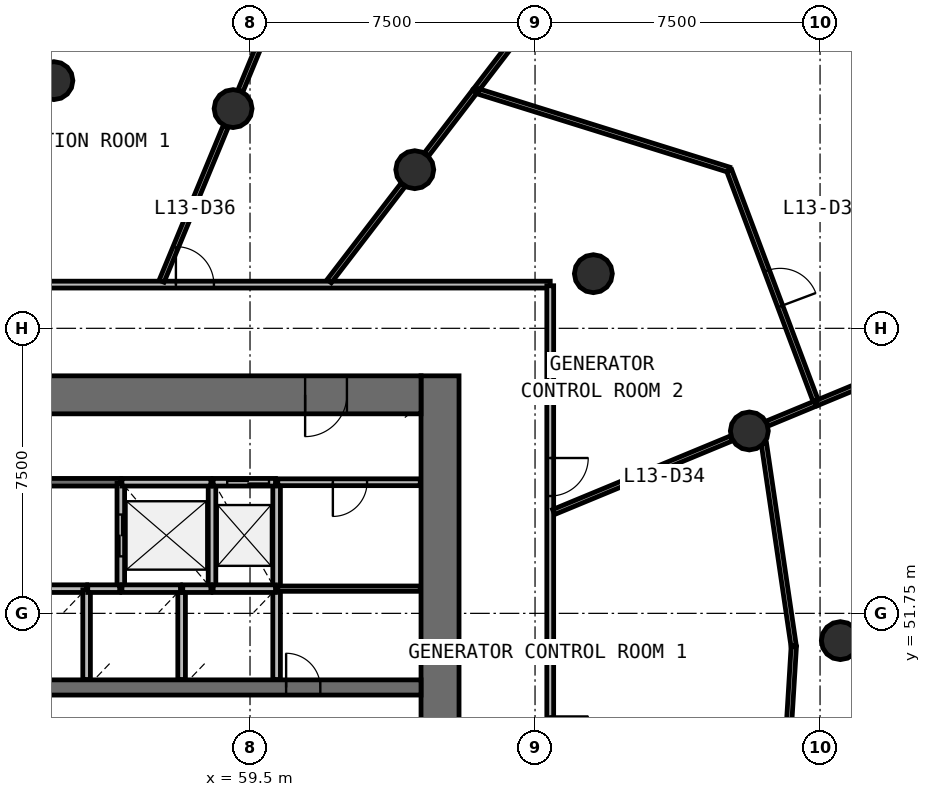
"""IFC4 building model, lengths in metres.
Left out: names, types, materials, properties, quantities, classifications, styles, units other than length and angle.
Written with IfcOpenShell. Run it as: python <this file> out.ifc"""

import sys

from ifc_helpers import new_model, si_unit, direction, frame, frame_2d, origin, origin_2d, place, context, subcontext, project, spatial, rectangle, circle, extrude, source, transform, mapped, element, fill, save


model = new_model("IFC4")
c1 = context("Model", 3, precision=1e-05, world=origin(), true_north=direction((0.0, 1.0)))
c2 = subcontext(c1, "Body", "Model", "MODEL_VIEW")
j1 = project(units=[si_unit("LENGTHUNIT", "METRE"), si_unit("PLANEANGLEUNIT", "RADIAN")], contexts=[c1])
p1 = place(None, origin())
s1 = spatial("IfcSite", under=j1, at=p1, CompositionType="ELEMENT")
p2 = place(p1, origin())
s2 = spatial("IfcBuilding", under=s1, at=p2, CompositionType="ELEMENT")
p3 = place(p2, frame((0.0, 0.0, 57.8)))
s3 = spatial("IfcBuildingStorey", under=s2, at=p3, CompositionType="ELEMENT", Elevation=57.8)
p4 = place(p3, frame((64.5, 38.0, 0.0), z_axis=(0.0, 0.0, 1.0), x_axis=(0.0, 1.0, 0.0)))
e1 = element("IfcWall", 1, at=p4, inside=s3, PredefinedType="SHEAR", context=c2, shape_type="SweptSolid", body=[
    extrude(rectangle(XDim=20.0, YDim=1.0, at=frame_2d((10.0, 0.0))), origin(), (0.0, 0.0, 1.0), 4.4),
])
p5 = place(p4, frame((9.1, 0.0, 0.0)))
e2 = element("IfcOpeningElement", 2, at=p5, cuts=e1, PredefinedType="OPENING", context=c2, shape_type="SweptSolid", body=[
    extrude(rectangle(XDim=1.8, YDim=2.1, at=frame_2d((0.9, 1.05))), frame((0.0, 0.51, 0.0), z_axis=(0.0, -1.0, 0.0), x_axis=(1.0, 0.0, 0.0)), (0.0, 0.0, 1.0), 1.02),
])
p6 = place(p3, frame((64.0, 57.5, 0.0), z_axis=(0.0, 0.0, 1.0), x_axis=(-1.0, 0.0, 0.0)))
e3 = element("IfcWall", 3, at=p6, inside=s3, PredefinedType="SHEAR", context=c2, shape_type="SweptSolid", body=[
    extrude(rectangle(XDim=24.0, YDim=1.0, at=frame_2d((12.0, 0.0))), origin(), (0.0, 0.0, 1.0), 4.4),
])
p7 = place(p6, frame((21.45, 0.0, 0.0)))
e4 = element("IfcOpeningElement", 4, at=p7, cuts=e3, PredefinedType="OPENING", context=c2, shape_type="SweptSolid", body=[
    extrude(rectangle(XDim=1.1, YDim=2.1, at=frame_2d((0.55, 1.05))), frame((0.0, 0.51, 0.0), z_axis=(0.0, -1.0, 0.0), x_axis=(1.0, 0.0, 0.0)), (0.0, 0.0, 1.0), 1.02),
])
p8 = place(p6, frame((1.95, 0.0, 0.0)))
e5 = element("IfcOpeningElement", 5, at=p8, cuts=e3, PredefinedType="OPENING", context=c2, shape_type="SweptSolid", body=[
    extrude(rectangle(XDim=1.1, YDim=2.1, at=frame_2d((0.55, 1.05))), frame((0.0, 0.51, 0.0), z_axis=(0.0, -1.0, 0.0), x_axis=(1.0, 0.0, 0.0)), (0.0, 0.0, 1.0), 1.02),
])
p9 = place(p3, frame((40.0, 49.8, 0.0), z_axis=(0.0, 0.0, 1.0), x_axis=(1.0, 0.0, 0.0)))
e6 = element("IfcWall", 6, at=p9, inside=s3, PredefinedType="SHEAR", context=c2, shape_type="SweptSolid", body=[
    extrude(rectangle(XDim=24.0, YDim=0.4, at=frame_2d((12.0, 0.0))), origin(), (0.0, 0.0, 1.0), 4.4),
])
p10 = place(p9, frame((4.5, 0.0, 0.0)))
e7 = element("IfcOpeningElement", 7, at=p10, cuts=e6, PredefinedType="OPENING", context=c2, shape_type="SweptSolid", body=[
    extrude(rectangle(XDim=1.1, YDim=2.1, at=frame_2d((0.55, 1.05))), frame((0.0, 0.21, 0.0), z_axis=(0.0, -1.0, 0.0), x_axis=(1.0, 0.0, 0.0)), (0.0, 0.0, 1.0), 0.42),
])
p11 = place(p9, frame((7.0, 0.0, 0.0)))
e8 = element("IfcOpeningElement", 8, at=p11, cuts=e6, PredefinedType="OPENING", context=c2, shape_type="SweptSolid", body=[
    extrude(rectangle(XDim=1.1, YDim=2.1, at=frame_2d((0.55, 1.05))), frame((0.0, 0.21, 0.0), z_axis=(0.0, -1.0, 0.0), x_axis=(1.0, 0.0, 0.0)), (0.0, 0.0, 1.0), 0.42),
])
p12 = place(p9, frame((9.5, 0.0, 0.0)))
e9 = element("IfcOpeningElement", 9, at=p12, cuts=e6, PredefinedType="OPENING", context=c2, shape_type="SweptSolid", body=[
    extrude(rectangle(XDim=1.1, YDim=2.1, at=frame_2d((0.55, 1.05))), frame((0.0, 0.21, 0.0), z_axis=(0.0, -1.0, 0.0), x_axis=(1.0, 0.0, 0.0)), (0.0, 0.0, 1.0), 0.42),
])
p13 = place(p9, frame((0.9, 0.0, 0.0)))
e10 = element("IfcOpeningElement", 10, at=p13, cuts=e6, PredefinedType="OPENING", context=c2, shape_type="SweptSolid", body=[
    extrude(rectangle(XDim=1.8, YDim=2.4, at=frame_2d((0.9, 1.2))), frame((0.0, 0.21, 0.0), z_axis=(0.0, -1.0, 0.0), x_axis=(1.0, 0.0, 0.0)), (0.0, 0.0, 1.0), 0.42),
])
p14 = place(p9, frame((20.45, 0.0, 0.0)))
e11 = element("IfcOpeningElement", 11, at=p14, cuts=e6, PredefinedType="OPENING", context=c2, shape_type="SweptSolid", body=[
    extrude(rectangle(XDim=0.9, YDim=2.1, at=frame_2d((0.45, 1.05))), frame((0.0, 0.21, 0.0), z_axis=(0.0, -1.0, 0.0), x_axis=(1.0, 0.0, 0.0)), (0.0, 0.0, 1.0), 0.42),
])
p15 = place(p9, frame((11.65, 0.0, 0.0)))
e12 = element("IfcOpeningElement", 12, at=p15, cuts=e6, PredefinedType="OPENING", context=c2, shape_type="SweptSolid", body=[
    extrude(rectangle(XDim=0.9, YDim=2.1, at=frame_2d((0.45, 1.05))), frame((0.0, 0.21, 0.0), z_axis=(0.0, -1.0, 0.0), x_axis=(1.0, 0.0, 0.0)), (0.0, 0.0, 1.0), 0.42),
])
m1 = source(origin(), c2, "Body", "SweptSolid", [
    extrude(circle(Radius=0.5, at=origin_2d()), origin(), (0.0, 0.0, 1.0), 4.4),
])
for number, where, z_axis, x_axis in (
    (13, (75.034, 51.032, 0.0), (0.0, 0.0, 1.0), (1.0, 0.0, 0.0)),
    (14, (72.639, 56.549, 0.0), (0.0, 0.0, 1.0), (1.0, 0.0, 0.0)),
    (15, (68.535, 60.688, 0.0), (0.0, 0.0, 1.0), (1.0, 0.0, 0.0)),
    (16, (63.835, 63.424, 0.0), (0.0, 0.0, 1.0), (1.0, 0.0, 0.0)),
    (17, (59.055, 65.031, 0.0), (0.0, 0.0, 1.0), (1.0, 0.0, 0.0)),
    (18, (54.339, 65.767, 0.0), (0.0, 0.0, 1.0), (1.0, 0.0, 0.0)),
):
    element("IfcColumn", number, at=place(p3, frame(where, z_axis=z_axis, x_axis=x_axis)), inside=s3, PredefinedType="COLUMN", context=c2, shape_type="MappedRepresentation", body=[
        mapped(m1, transform((0.0, 0.0, 0.0), scale=1.0)),
    ])
p16 = place(p3, frame((56.1, 55.2, 0.0), z_axis=(0.0, 0.0, 1.0), x_axis=(-1.0, 0.0, 0.0)))
e19 = element("IfcWall", 19, at=p16, inside=s3, PredefinedType="SOLIDWALL", context=c2, shape_type="SweptSolid", body=[
    extrude(rectangle(XDim=5.67, YDim=0.2, at=frame_2d((2.835, 0.0))), origin(), (0.0, 0.0, 1.0), 3.95),
])
p17 = place(p16, frame((2.95, 0.0, 0.0)))
e20 = element("IfcOpeningElement", 20, at=p17, cuts=e19, PredefinedType="OPENING", context=c2, shape_type="SweptSolid", body=[
    extrude(rectangle(XDim=1.1, YDim=2.1, at=frame_2d((0.55, 1.05))), frame((0.0, 0.11, 0.0), z_axis=(0.0, -1.0, 0.0), x_axis=(1.0, 0.0, 0.0)), (0.0, 0.0, 1.0), 0.22),
])
p18 = place(p3, frame((56.1, 55.17, 0.0), z_axis=(0.0, 0.0, 1.0), x_axis=(0.0, -1.0, 0.0)))
e21 = element("IfcWall", 21, at=p18, inside=s3, PredefinedType="SOLIDWALL", context=c2, shape_type="SweptSolid", body=[
    extrude(rectangle(XDim=2.77, YDim=0.2, at=frame_2d((1.385, 0.0))), origin(), (0.0, 0.0, 1.0), 3.95),
])
p19 = place(p18, frame((0.82, 0.0, 0.0)))
e22 = element("IfcOpeningElement", 22, at=p19, cuts=e21, PredefinedType="OPENING", context=c2, shape_type="SweptSolid", body=[
    extrude(rectangle(XDim=1.1, YDim=2.1, at=frame_2d((0.55, 1.05))), frame((0.0, 0.11, 0.0), z_axis=(0.0, -1.0, 0.0), x_axis=(1.0, 0.0, 0.0)), (0.0, 0.0, 1.0), 0.22),
])
for number, where, z_axis, x_axis in (
    (23, (58.5, 52.4, 0.0), (0.0, 0.0, 1.0), (0.0, 1.0, 0.0)),
    (24, (60.2, 52.4, 0.0), (0.0, 0.0, 1.0), (0.0, 1.0, 0.0)),
):
    element("IfcWall", number, at=place(p3, frame(where, z_axis=z_axis, x_axis=x_axis)), inside=s3, PredefinedType="SOLIDWALL", context=c2, shape_type="SweptSolid", body=[
        extrude(rectangle(XDim=2.8, YDim=0.2, at=frame_2d((1.4, 0.0))), origin(), (0.0, 0.0, 1.0), 3.95),
    ])
p20 = place(p3, frame((55.2, 52.4, 0.0), z_axis=(0.0, 0.0, 1.0), x_axis=(-1.0, 0.0, 0.0)))
e25 = element("IfcWall", 25, at=p20, inside=s3, PredefinedType="SOLIDWALL", context=c2, shape_type="SweptSolid", body=[
    extrude(rectangle(XDim=2.5, YDim=0.2, at=frame_2d((1.25, 0.0))), origin(), (0.0, 0.0, 1.0), 3.95),
])
p21 = place(p3, frame((58.47, 55.2, 0.0), z_axis=(0.0, 0.0, 1.0), x_axis=(-1.0, 0.0, 0.0)))
e26 = element("IfcWall", 26, at=p21, inside=s3, PredefinedType="SOLIDWALL", context=c2, shape_type="SweptSolid", body=[
    extrude(rectangle(XDim=2.34, YDim=0.2, at=frame_2d((1.17, 0.0))), origin(), (0.0, 0.0, 1.0), 3.95),
])
p22 = place(p3, frame((55.2, 50.01, 0.0), z_axis=(0.0, 0.0, 1.0), x_axis=(0.0, 1.0, 0.0)))
e27 = element("IfcWall", 27, at=p22, inside=s3, PredefinedType="SOLIDWALL", context=c2, shape_type="SweptSolid", body=[
    extrude(rectangle(XDim=2.36, YDim=0.2, at=frame_2d((1.18, 0.0))), origin(), (0.0, 0.0, 1.0), 3.95),
])
p23 = place(p3, frame((57.7, 50.01, 0.0), z_axis=(0.0, 0.0, 1.0), x_axis=(0.0, 1.0, 0.0)))
e28 = element("IfcWall", 28, at=p23, inside=s3, PredefinedType="SOLIDWALL", context=c2, shape_type="SweptSolid", body=[
    extrude(rectangle(XDim=2.39, YDim=0.2, at=frame_2d((1.195, 0.0))), origin(), (0.0, 0.0, 1.0), 3.95),
])
p24 = place(p3, frame((60.2, 50.01, 0.0), z_axis=(0.0, 0.0, 1.0), x_axis=(0.0, 1.0, 0.0)))
e29 = element("IfcWall", 29, at=p24, inside=s3, PredefinedType="SOLIDWALL", context=c2, shape_type="SweptSolid", body=[
    extrude(rectangle(XDim=2.36, YDim=0.2, at=frame_2d((1.18, 0.0))), origin(), (0.0, 0.0, 1.0), 3.95),
])
p25 = place(p3, frame((60.17, 52.4, 0.0), z_axis=(0.0, 0.0, 1.0), x_axis=(-1.0, 0.0, 0.0)))
e30 = element("IfcWall", 30, at=p25, inside=s3, PredefinedType="SOLIDWALL", context=c2, shape_type="SweptSolid", body=[
    extrude(rectangle(XDim=1.64, YDim=0.2, at=frame_2d((0.82, 0.0))), origin(), (0.0, 0.0, 1.0), 3.95),
])
p26 = place(p3, frame((60.17, 55.2, 0.0), z_axis=(0.0, 0.0, 1.0), x_axis=(-1.0, 0.0, 0.0)))
e31 = element("IfcWall", 31, at=p26, inside=s3, PredefinedType="SOLIDWALL", context=c2, shape_type="SweptSolid", body=[
    extrude(rectangle(XDim=1.64, YDim=0.2, at=frame_2d((0.82, 0.0))), origin(), (0.0, 0.0, 1.0), 3.95),
])
p27 = place(p26, frame((0.17, 0.0, 0.0)))
e32 = element("IfcOpeningElement", 32, at=p27, cuts=e31, PredefinedType="OPENING", context=c2, shape_type="SweptSolid", body=[
    extrude(rectangle(XDim=1.1, YDim=2.1, at=frame_2d((0.55, 1.05))), frame((0.0, 0.11, 0.0), z_axis=(0.0, -1.0, 0.0), x_axis=(1.0, 0.0, 0.0)), (0.0, 0.0, 1.0), 0.22),
])
p28 = place(p3, frame((57.67, 52.4, 0.0), z_axis=(0.0, 0.0, 1.0), x_axis=(-1.0, 0.0, 0.0)))
e33 = element("IfcWall", 33, at=p28, inside=s3, PredefinedType="SOLIDWALL", context=c2, shape_type="SweptSolid", body=[
    extrude(rectangle(XDim=1.54, YDim=0.2, at=frame_2d((0.77, 0.0))), origin(), (0.0, 0.0, 1.0), 3.95),
])
p29 = place(p3, frame((56.07, 52.4, 0.0), z_axis=(0.0, 0.0, 1.0), x_axis=(-1.0, 0.0, 0.0)))
e34 = element("IfcWall", 34, at=p29, inside=s3, PredefinedType="SOLIDWALL", context=c2, shape_type="SweptSolid", body=[
    extrude(rectangle(XDim=0.84, YDim=0.2, at=frame_2d((0.42, 0.0))), origin(), (0.0, 0.0, 1.0), 3.95),
])
p30 = place(p3, frame((58.47, 52.4, 0.0), z_axis=(0.0, 0.0, 1.0), x_axis=(-1.0, 0.0, 0.0)))
e35 = element("IfcWall", 35, at=p30, inside=s3, PredefinedType="SOLIDWALL", context=c2, shape_type="SweptSolid", body=[
    extrude(rectangle(XDim=0.74, YDim=0.2, at=frame_2d((0.37, 0.0))), origin(), (0.0, 0.0, 1.0), 3.95),
])
p31 = place(p3, frame((36.6, 60.4, 0.0), z_axis=(0.0, 0.0, 1.0), x_axis=(1.0, 0.0, 0.0)))
e36 = element("IfcWall", 36, at=p31, inside=s3, PredefinedType="PARTITIONING", context=c2, shape_type="SweptSolid", body=[
    extrude(rectangle(XDim=30.8, YDim=0.18, at=frame_2d((15.4, 0.0))), origin(), (0.0, 0.0, 1.0), 3.05),
])
p32 = place(p31, frame((20.95, 0.0, 0.0)))
e37 = element("IfcOpeningElement", 37, at=p32, cuts=e36, PredefinedType="OPENING", context=c2, shape_type="SweptSolid", body=[
    extrude(rectangle(XDim=1.0, YDim=2.1, at=frame_2d((0.5, 1.05))), frame((0.0, 0.1, 0.0), z_axis=(0.0, -1.0, 0.0), x_axis=(1.0, 0.0, 0.0)), (0.0, 0.0, 1.0), 0.2),
])
p33 = place(p31, frame((14.95, 0.0, 0.0)))
e38 = element("IfcOpeningElement", 38, at=p33, cuts=e36, PredefinedType="OPENING", context=c2, shape_type="SweptSolid", body=[
    extrude(rectangle(XDim=1.0, YDim=2.1, at=frame_2d((0.5, 1.05))), frame((0.0, 0.1, 0.0), z_axis=(0.0, -1.0, 0.0), x_axis=(1.0, 0.0, 0.0)), (0.0, 0.0, 1.0), 0.2),
])
p34 = place(p31, frame((4.35, 0.0, 0.0)))
e39 = element("IfcOpeningElement", 39, at=p34, cuts=e36, PredefinedType="OPENING", context=c2, shape_type="SweptSolid", body=[
    extrude(rectangle(XDim=1.0, YDim=2.1, at=frame_2d((0.5, 1.05))), frame((0.0, 0.1, 0.0), z_axis=(0.0, -1.0, 0.0), x_axis=(1.0, 0.0, 0.0)), (0.0, 0.0, 1.0), 0.2),
])
p35 = place(p3, frame((67.4, 60.37, 0.0), z_axis=(0.0, 0.0, 1.0), x_axis=(0.0, -1.0, 0.0)))
e40 = element("IfcWall", 40, at=p35, inside=s3, PredefinedType="PARTITIONING", context=c2, shape_type="SweptSolid", body=[
    extrude(rectangle(XDim=23.583, YDim=0.18, at=frame_2d((11.791, 0.0))), origin(), (0.0, 0.0, 1.0), 3.05),
])
p36 = place(p35, frame((11.333, 0.0, 0.0)))
e41 = element("IfcOpeningElement", 41, at=p36, cuts=e40, PredefinedType="OPENING", context=c2, shape_type="SweptSolid", body=[
    extrude(rectangle(XDim=1.0, YDim=2.1, at=frame_2d((0.5, 1.05))), frame((0.0, 0.1, 0.0), z_axis=(0.0, -1.0, 0.0), x_axis=(1.0, 0.0, 0.0)), (0.0, 0.0, 1.0), 0.2),
])
p37 = place(p35, frame((4.532, 0.0, 0.0)))
e42 = element("IfcOpeningElement", 42, at=p37, cuts=e40, PredefinedType="OPENING", context=c2, shape_type="SweptSolid", body=[
    extrude(rectangle(XDim=1.0, YDim=2.1, at=frame_2d((0.5, 1.05))), frame((0.0, 0.1, 0.0), z_axis=(0.0, -1.0, 0.0), x_axis=(1.0, 0.0, 0.0)), (0.0, 0.0, 1.0), 0.2),
])
p38 = place(p3, frame((63.98, 55.2, 0.0), z_axis=(0.0, 0.0, 1.0), x_axis=(-1.0, 0.0, 0.0)))
e43 = element("IfcWall", 43, at=p38, inside=s3, PredefinedType="PARTITIONING", context=c2, shape_type="SweptSolid", body=[
    extrude(rectangle(XDim=3.75, YDim=0.18, at=frame_2d((1.875, 0.0))), origin(), (0.0, 0.0, 1.0), 3.95),
])
p39 = place(p38, frame((1.4, 0.0, 0.0)))
e44 = element("IfcOpeningElement", 44, at=p39, cuts=e43, PredefinedType="OPENING", context=c2, shape_type="SweptSolid", body=[
    extrude(rectangle(XDim=0.9, YDim=2.1, at=frame_2d((0.45, 1.05))), frame((0.0, 0.1, 0.0), z_axis=(0.0, -1.0, 0.0), x_axis=(1.0, 0.0, 0.0)), (0.0, 0.0, 1.0), 0.2),
])
p40 = place(p3, frame((74.407, 57.281, 0.0), z_axis=(0.0, 0.0, 1.0), x_axis=(0.923881624853, 0.382678380966, 0.0)))
e45 = element("IfcWall", 45, at=p40, inside=s3, PredefinedType="PARTITIONING", context=c2, shape_type="SweptSolid", body=[
    extrude(rectangle(XDim=9.947, YDim=0.14, at=frame_2d((4.974, 0.0))), origin(), (0.0, 0.0, 1.0), 3.05),
])
p41 = place(p3, frame((65.433, 65.507, 0.0), z_axis=(0.0, 0.0, 1.0), x_axis=(0.608761001487, 0.79335366834, 0.0)))
e46 = element("IfcWall", 46, at=p41, inside=s3, PredefinedType="PARTITIONING", context=c2, shape_type="SweptSolid", body=[
    extrude(rectangle(XDim=7.606, YDim=0.14, at=frame_2d((3.803, 0.0))), origin(), (0.0, 0.0, 1.0), 3.05),
])
p42 = place(p3, frame((72.101, 63.424, 0.0), z_axis=(0.0, 0.0, 1.0), x_axis=(-0.954540929829, 0.298079877351, 0.0)))
e47 = element("IfcWall", 47, at=p42, inside=s3, PredefinedType="PARTITIONING", context=c2, shape_type="SweptSolid", body=[
    extrude(rectangle(XDim=6.911, YDim=0.14, at=frame_2d((3.456, 0.0))), origin(), (0.0, 0.0, 1.0), 3.05),
])
p43 = place(p3, frame((72.112, 63.396, 0.0), z_axis=(0.0, 0.0, 1.0), x_axis=(0.351475385959, -0.936197122974, 0.0)))
e48 = element("IfcWall", 48, at=p43, inside=s3, PredefinedType="PARTITIONING", context=c2, shape_type="SweptSolid", body=[
    extrude(rectangle(XDim=6.461, YDim=0.14, at=frame_2d((3.231, 0.0))), origin(), (0.0, 0.0, 1.0), 3.05),
])
p44 = place(p43, frame((2.811, 0.0, 0.0)))
e49 = element("IfcOpeningElement", 49, at=p44, cuts=e48, PredefinedType="OPENING", context=c2, shape_type="SweptSolid", body=[
    extrude(rectangle(XDim=1.0, YDim=2.1, at=frame_2d((0.5, 1.05))), frame((0.0, 0.08, 0.0), z_axis=(0.0, -1.0, 0.0), x_axis=(1.0, 0.0, 0.0)), (0.0, 0.0, 1.0), 0.16),
])
p45 = place(p3, frame((73.808, 50.871, 0.0), z_axis=(0.0, 0.0, 1.0), x_axis=(-0.061254326826, -0.998122190639, 0.0)))
e50 = element("IfcWall", 50, at=p45, inside=s3, PredefinedType="PARTITIONING", context=c2, shape_type="SweptSolid", body=[
    extrude(rectangle(XDim=5.437, YDim=0.14, at=frame_2d((2.718, 0.0))), origin(), (0.0, 0.0, 1.0), 3.05),
])
p46 = place(p45, frame((2.186, 0.0, 0.0)))
e51 = element("IfcOpeningElement", 51, at=p46, cuts=e50, PredefinedType="OPENING", context=c2, shape_type="SweptSolid", body=[
    extrude(rectangle(XDim=1.0, YDim=2.1, at=frame_2d((0.5, 1.05))), frame((0.0, 0.08, 0.0), z_axis=(0.0, -1.0, 0.0), x_axis=(1.0, 0.0, 0.0)), (0.0, 0.0, 1.0), 0.16),
])
p47 = place(p3, frame((73.804, 50.901, 0.0), z_axis=(0.0, 0.0, 1.0), x_axis=(-0.145444313647, 0.989366439509, 0.0)))
e52 = element("IfcWall", 52, at=p47, inside=s3, PredefinedType="PARTITIONING", context=c2, shape_type="SweptSolid", body=[
    extrude(rectangle(XDim=5.376, YDim=0.14, at=frame_2d((2.688, 0.0))), origin(), (0.0, 0.0, 1.0), 3.05),
])
p48 = place(p3, frame((67.49, 54.416, 0.0), z_axis=(0.0, 0.0, 1.0), x_axis=(0.923890025086, 0.382658100067, 0.0)))
e53 = element("IfcWall", 53, at=p48, inside=s3, PredefinedType="PARTITIONING", context=c2, shape_type="SweptSolid", body=[
    extrude(rectangle(XDim=5.068, YDim=0.14, at=frame_2d((2.534, 0.0))), origin(), (0.0, 0.0, 1.0), 3.05),
])
p49 = place(p3, frame((57.174, 60.49, 0.0), z_axis=(0.0, 0.0, 1.0), x_axis=(0.382672831764, 0.923883923353, 0.0)))
e54 = element("IfcWall", 54, at=p49, inside=s3, PredefinedType="PARTITIONING", context=c2, shape_type="SweptSolid", body=[
    extrude(rectangle(XDim=4.41, YDim=0.14, at=frame_2d((2.205, 0.0))), origin(), (0.0, 0.0, 1.0), 3.05),
])
p50 = place(p3, frame((63.98, 52.4, 0.0), z_axis=(0.0, 0.0, 1.0), x_axis=(-1.0, 0.0, 0.0)))
e55 = element("IfcWall", 55, at=p50, inside=s3, PredefinedType="PARTITIONING", context=c2, shape_type="SweptSolid", body=[
    extrude(rectangle(XDim=3.75, YDim=0.14, at=frame_2d((1.875, 0.0))), origin(), (0.0, 0.0, 1.0), 3.05),
])
p51 = place(p3, frame((59.248, 65.498, 0.0), z_axis=(0.0, 0.0, 1.0), x_axis=(0.382707244595, 0.923869668803, 0.0)))
e56 = element("IfcWall", 56, at=p51, inside=s3, PredefinedType="PARTITIONING", context=c2, shape_type="SweptSolid", body=[
    extrude(rectangle(XDim=3.599, YDim=0.14, at=frame_2d((1.8, 0.0))), origin(), (0.0, 0.0, 1.0), 3.05),
])
p52 = place(p3, frame((61.584, 60.49, 0.0), z_axis=(0.0, 0.0, 1.0), x_axis=(0.60874605662, 0.793365135703, 0.0)))
e57 = element("IfcWall", 57, at=p52, inside=s3, PredefinedType="PARTITIONING", context=c2, shape_type="SweptSolid", body=[
    extrude(rectangle(XDim=3.194, YDim=0.14, at=frame_2d((1.597, 0.0))), origin(), (0.0, 0.0, 1.0), 3.05),
])
p53 = place(p3, frame((64.142, 63.824, 0.0), z_axis=(0.0, 0.0, 1.0), x_axis=(0.608762392913, 0.793352600661, 0.0)))
e58 = element("IfcWall", 58, at=p53, inside=s3, PredefinedType="PARTITIONING", context=c2, shape_type="SweptSolid", body=[
    extrude(rectangle(XDim=2.091, YDim=0.14, at=frame_2d((1.045, 0.0))), origin(), (0.0, 0.0, 1.0), 3.05),
])
p54 = place(p3, frame((73.106, 56.742, 0.0), z_axis=(0.0, 0.0, 1.0), x_axis=(0.923813917136, 0.382841803498, 0.0)))
e59 = element("IfcWall", 59, at=p54, inside=s3, PredefinedType="PARTITIONING", context=c2, shape_type="SweptSolid", body=[
    extrude(rectangle(XDim=1.379, YDim=0.14, at=frame_2d((0.689, 0.0))), origin(), (0.0, 0.0, 1.0), 3.05),
])
m2 = source(origin(), c2, "Body", "SweptSolid", [
    extrude(rectangle(XDim=1.1, YDim=2.1, at=frame_2d((0.55, 1.05))), frame((0.0, 0.025, 0.0), z_axis=(0.0, -1.0, 0.0), x_axis=(1.0, 0.0, 0.0)), (0.0, 0.0, 1.0), 0.05),
])
p55 = place(p19, origin())
e60 = element("IfcDoor", 60, at=p55, inside=s3, OperationType="DOUBLE_DOOR_SLIDING", PredefinedType="USERDEFINED", context=c2, shape_type="MappedRepresentation", body=[
    mapped(m2, transform((0.0, 0.0, 0.0), scale=1.0)),
])
fill(e22, e60)
p56 = place(p27, origin())
e61 = element("IfcDoor", 61, at=p56, inside=s3, OperationType="DOUBLE_DOOR_SLIDING", PredefinedType="USERDEFINED", context=c2, shape_type="MappedRepresentation", body=[
    mapped(m2, transform((0.0, 0.0, 0.0), scale=1.0)),
])
fill(e32, e61)
m3 = source(origin(), c2, "Body", "SweptSolid", [
    extrude(rectangle(XDim=1.1, YDim=2.1, at=frame_2d((0.55, 1.05))), frame((0.0, 0.025, 0.0), z_axis=(0.0, -1.0, 0.0), x_axis=(1.0, 0.0, 0.0)), (0.0, 0.0, 1.0), 0.05),
])
p57 = place(p8, origin())
e62 = element("IfcDoor", 62, at=p57, inside=s3, OperationType="SINGLE_SWING_RIGHT", PredefinedType="DOOR", context=c2, shape_type="MappedRepresentation", body=[
    mapped(m3, transform((0.0, 0.0, 0.0), scale=1.0)),
])
fill(e5, e62)
m4 = source(origin(), c2, "Body", "SweptSolid", [
    extrude(rectangle(XDim=1.0, YDim=2.1, at=frame_2d((0.5, 1.05))), frame((0.0, 0.025, 0.0), z_axis=(0.0, -1.0, 0.0), x_axis=(1.0, 0.0, 0.0)), (0.0, 0.0, 1.0), 0.05),
])
p58 = place(p36, origin())
e63 = element("IfcDoor", 63, at=p58, inside=s3, OperationType="SINGLE_SWING_LEFT", PredefinedType="DOOR", context=c2, shape_type="MappedRepresentation", body=[
    mapped(m4, transform((0.0, 0.0, 0.0), scale=1.0)),
])
fill(e41, e63)
p59 = place(p37, origin())
e64 = element("IfcDoor", 64, at=p59, inside=s3, OperationType="SINGLE_SWING_LEFT", PredefinedType="DOOR", context=c2, shape_type="MappedRepresentation", body=[
    mapped(m4, transform((0.0, 0.0, 0.0), scale=1.0)),
])
fill(e42, e64)
p60 = place(p44, origin())
e65 = element("IfcDoor", 65, at=p60, inside=s3, OperationType="SINGLE_SWING_RIGHT", PredefinedType="DOOR", context=c2, shape_type="MappedRepresentation", body=[
    mapped(m4, transform((0.0, 0.0, 0.0), scale=1.0)),
])
fill(e49, e65)
p61 = place(p32, origin())
e66 = element("IfcDoor", 66, at=p61, inside=s3, OperationType="SINGLE_SWING_LEFT", PredefinedType="DOOR", context=c2, shape_type="MappedRepresentation", body=[
    mapped(m4, transform((0.0, 0.0, 0.0), scale=1.0)),
])
fill(e37, e66)
m5 = source(origin(), c2, "Body", "SweptSolid", [
    extrude(rectangle(XDim=0.9, YDim=2.1, at=frame_2d((0.45, 1.05))), frame((0.0, 0.025, 0.0), z_axis=(0.0, -1.0, 0.0), x_axis=(1.0, 0.0, 0.0)), (0.0, 0.0, 1.0), 0.05),
])
p62 = place(p14, origin())
e67 = element("IfcDoor", 67, at=p62, inside=s3, OperationType="SINGLE_SWING_LEFT", PredefinedType="DOOR", context=c2, shape_type="MappedRepresentation", body=[
    mapped(m5, transform((0.0, 0.0, 0.0), scale=1.0)),
])
fill(e11, e67)
p63 = place(p39, origin())
e68 = element("IfcDoor", 68, at=p63, inside=s3, OperationType="SINGLE_SWING_RIGHT", PredefinedType="DOOR", context=c2, shape_type="MappedRepresentation", body=[
    mapped(m5, transform((0.0, 0.0, 0.0), scale=1.0)),
])
fill(e44, e68)
save(model, sys.argv[1])
